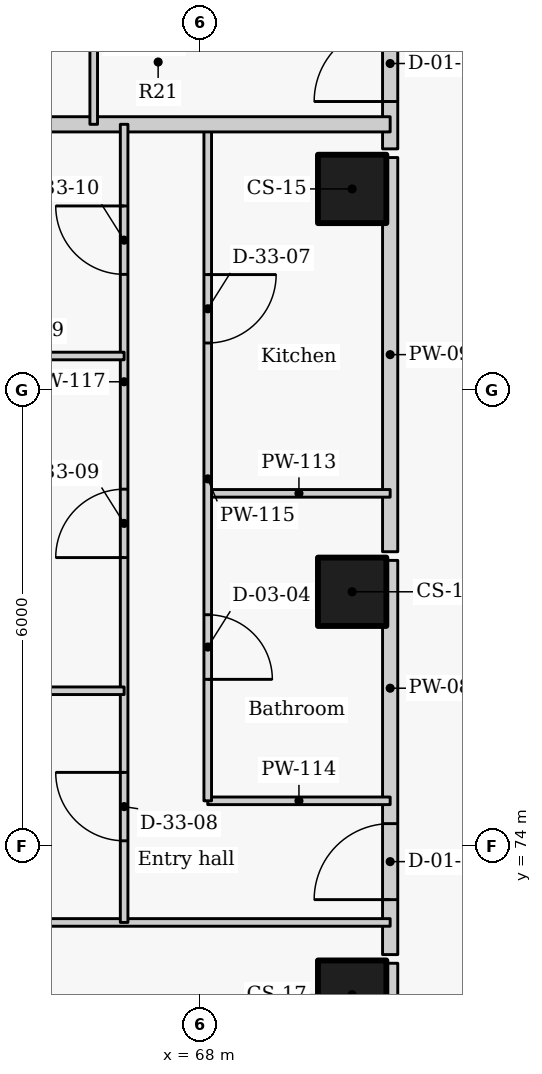
"""IFC4 building model, lengths in metres.
Left out: names, types, materials, properties, quantities, classifications, styles, units other than length and angle.
Written with IfcOpenShell. Run it as: python <this file> out.ifc"""

import sys

from ifc_helpers import new_model, si_unit, direction, frame, frame_2d, origin, origin_2d, place, context, subcontext, project, spatial, rectangle, extrude, element, fill, save


model = new_model("IFC4")
c1 = context("Model", 3, precision=1e-05, world=origin(), true_north=direction((0.0, 1.0)))
c2 = subcontext(c1, "Body", "Model", "MODEL_VIEW")
j1 = project(units=[si_unit("LENGTHUNIT", "METRE"), si_unit("PLANEANGLEUNIT", "RADIAN")], contexts=[c1])
p1 = place(None, origin())
s1 = spatial("IfcSite", under=j1, at=p1, CompositionType="ELEMENT")
p2 = place(p1, origin())
s2 = spatial("IfcBuilding", under=s1, at=p2, CompositionType="ELEMENT")
p3 = place(p2, frame((0.0, 0.0, 259.2)))
s3 = spatial("IfcBuildingStorey", under=s2, at=p3, CompositionType="ELEMENT", Elevation=259.2)
for number, where, z_axis, x_axis in (
    (1, (70.0, 82.65, 0.0), (0.0, 0.0, 1.0), (0.0, -1.0, 0.0)),
    (2, (70.0, 77.35, 0.0), (0.0, 0.0, 1.0), (0.0, -1.0, 0.0)),
    (3, (70.0, 72.05, 0.0), (0.0, 0.0, 1.0), (0.0, -1.0, 0.0)),
):
    element("IfcColumn", number, at=place(p3, frame(where, z_axis=z_axis, x_axis=x_axis)), inside=s3, PredefinedType="COLUMN", context=c2, shape_type="SweptSolid", body=[
        extrude(rectangle(XDim=0.9, YDim=0.9, at=origin_2d()), origin(), (0.0, 0.0, 1.0), 3.3),
    ])
p4 = place(p3, frame((70.5, 68.227, 0.0), z_axis=(0.0, 0.0, 1.0), x_axis=(0.0, 1.0, 0.0)))
e4 = element("IfcWall", 4, at=p4, inside=s3, PredefinedType="PARTITIONING", context=c2, shape_type="SweptSolid", body=[
    extrude(rectangle(XDim=4.236, YDim=0.2, at=frame_2d((2.118, 0.0))), origin(), (0.0, 0.0, 1.0), 3.025),
])
p5 = place(p4, frame((1.618, 0.0, 0.0)))
e5 = element("IfcOpeningElement", 5, at=p5, cuts=e4, PredefinedType="OPENING", context=c2, shape_type="SweptSolid", body=[
    extrude(rectangle(XDim=1.0, YDim=2.1, at=frame_2d((0.5, 1.05))), frame((0.0, 0.11, 0.0), z_axis=(0.0, -1.0, 0.0), x_axis=(1.0, 0.0, 0.0)), (0.0, 0.0, 1.0), 0.22),
])
p6 = place(p3, frame((70.5, 72.577, 0.0), z_axis=(0.0, 0.0, 1.0), x_axis=(0.0, 1.0, 0.0)))
e6 = element("IfcWall", 6, at=p6, inside=s3, PredefinedType="PARTITIONING", context=c2, shape_type="SweptSolid", body=[
    extrude(rectangle(XDim=5.186, YDim=0.2, at=frame_2d((2.593, 0.0))), origin(), (0.0, 0.0, 1.0), 3.025),
])
p7 = place(p6, frame((0.723, 0.0, 0.0)))
e7 = element("IfcOpeningElement", 7, at=p7, cuts=e6, PredefinedType="OPENING", context=c2, shape_type="SweptSolid", body=[
    extrude(rectangle(XDim=1.0, YDim=2.1, at=frame_2d((0.5, 1.05))), frame((0.0, 0.11, 0.0), z_axis=(0.0, -1.0, 0.0), x_axis=(1.0, 0.0, 0.0)), (0.0, 0.0, 1.0), 0.22),
])
p8 = place(p3, frame((70.5, 77.877, 0.0), z_axis=(0.0, 0.0, 1.0), x_axis=(0.0, 1.0, 0.0)))
e8 = element("IfcWall", 8, at=p8, inside=s3, PredefinedType="PARTITIONING", context=c2, shape_type="SweptSolid", body=[
    extrude(rectangle(XDim=5.186, YDim=0.2, at=frame_2d((2.593, 0.0))), origin(), (0.0, 0.0, 1.0), 3.025),
])
p9 = place(p3, frame((70.5, 83.177, 0.0), z_axis=(0.0, 0.0, 1.0), x_axis=(0.0, 1.0, 0.0)))
e9 = element("IfcWall", 9, at=p9, inside=s3, PredefinedType="PARTITIONING", context=c2, shape_type="SweptSolid", body=[
    extrude(rectangle(XDim=5.186, YDim=0.2, at=frame_2d((2.593, 0.0))), origin(), (0.0, 0.0, 1.0), 3.025),
])
p10 = place(p9, frame((0.623, 0.0, 0.0)))
e10 = element("IfcOpeningElement", 10, at=p10, cuts=e9, PredefinedType="OPENING", context=c2, shape_type="SweptSolid", body=[
    extrude(rectangle(XDim=1.0, YDim=2.1, at=frame_2d((0.5, 1.05))), frame((0.0, 0.11, 0.0), z_axis=(0.0, -1.0, 0.0), x_axis=(1.0, 0.0, 0.0)), (0.0, 0.0, 1.0), 0.22),
])
p11 = place(p3, frame((58.95, 73.0, 0.0), z_axis=(0.0, 0.0, 1.0), x_axis=(1.0, 0.0, 0.0)))
e11 = element("IfcWall", 11, at=p11, inside=s3, PredefinedType="PARTITIONING", context=c2, shape_type="SweptSolid", body=[
    extrude(rectangle(XDim=11.55, YDim=0.1, at=frame_2d((5.775, 0.0))), origin(), (0.0, 0.0, 1.0), 2.505),
])
for number, where, z_axis, x_axis in (
    (12, (68.1, 78.645, 0.0), (0.0, 0.0, 1.0), (1.0, 0.0, 0.0)),
    (13, (68.1, 74.6, 0.0), (0.0, 0.0, 1.0), (1.0, 0.0, 0.0)),
):
    element("IfcWall", number, at=place(p3, frame(where, z_axis=z_axis, x_axis=x_axis)), inside=s3, PredefinedType="PARTITIONING", context=c2, shape_type="SweptSolid", body=[
        extrude(rectangle(XDim=2.4, YDim=0.1, at=frame_2d((1.2, 0.0))), origin(), (0.0, 0.0, 1.0), 2.505),
    ])
p12 = place(p3, frame((68.1, 83.5, 0.0), z_axis=(0.0, 0.0, 1.0), x_axis=(0.0, -1.0, 0.0)))
e14 = element("IfcWall", 14, at=p12, inside=s3, PredefinedType="PARTITIONING", context=c2, shape_type="SweptSolid", body=[
    extrude(rectangle(XDim=8.9, YDim=0.1, at=frame_2d((4.45, 0.0))), origin(), (0.0, 0.0, 1.0), 3.025),
])
p13 = place(p12, frame((6.452, 0.0, 0.0)))
e15 = element("IfcOpeningElement", 15, at=p13, cuts=e14, PredefinedType="OPENING", context=c2, shape_type="SweptSolid", body=[
    extrude(rectangle(XDim=0.85, YDim=2.1, at=frame_2d((0.425, 1.05))), frame((0.0, 0.06, 0.0), z_axis=(0.0, -1.0, 0.0), x_axis=(1.0, 0.0, 0.0)), (0.0, 0.0, 1.0), 0.12),
])
p14 = place(p12, frame((1.977, 0.0, 0.0)))
e16 = element("IfcOpeningElement", 16, at=p14, cuts=e14, PredefinedType="OPENING", context=c2, shape_type="SweptSolid", body=[
    extrude(rectangle(XDim=0.9, YDim=2.1, at=frame_2d((0.45, 1.05))), frame((0.0, 0.06, 0.0), z_axis=(0.0, -1.0, 0.0), x_axis=(1.0, 0.0, 0.0)), (0.0, 0.0, 1.0), 0.12),
])
p15 = place(p3, frame((56.213, 83.5, 0.0), z_axis=(0.0, 0.0, 1.0), x_axis=(1.0, 0.0, 0.0)))
e17 = element("IfcWall", 17, at=p15, inside=s3, PredefinedType="PARTITIONING", context=c2, shape_type="SweptSolid", body=[
    extrude(rectangle(XDim=14.287, YDim=0.2, at=frame_2d((7.144, 0.0))), origin(), (0.0, 0.0, 1.0), 2.405),
])
p16 = place(p3, frame((67.0, 73.0, 0.0), z_axis=(0.0, 0.0, 1.0), x_axis=(0.0, 1.0, 0.0)))
e18 = element("IfcWall", 18, at=p16, inside=s3, PredefinedType="PARTITIONING", context=c2, shape_type="SweptSolid", body=[
    extrude(rectangle(XDim=10.5, YDim=0.1, at=frame_2d((5.25, 0.0))), origin(), (0.0, 0.0, 1.0), 3.025),
])
p17 = place(p16, frame((1.074, 0.0, 0.0)))
e19 = element("IfcOpeningElement", 19, at=p17, cuts=e18, PredefinedType="OPENING", context=c2, shape_type="SweptSolid", body=[
    extrude(rectangle(XDim=0.9, YDim=2.1, at=frame_2d((0.45, 1.05))), frame((0.0, 0.06, 0.0), z_axis=(0.0, -1.0, 0.0), x_axis=(1.0, 0.0, 0.0)), (0.0, 0.0, 1.0), 0.12),
])
p18 = place(p16, frame((4.8, 0.0, 0.0)))
e20 = element("IfcOpeningElement", 20, at=p18, cuts=e18, PredefinedType="OPENING", context=c2, shape_type="SweptSolid", body=[
    extrude(rectangle(XDim=0.9, YDim=2.1, at=frame_2d((0.45, 1.05))), frame((0.0, 0.06, 0.0), z_axis=(0.0, -1.0, 0.0), x_axis=(1.0, 0.0, 0.0)), (0.0, 0.0, 1.0), 0.12),
])
p19 = place(p16, frame((8.526, 0.0, 0.0)))
e21 = element("IfcOpeningElement", 21, at=p19, cuts=e18, PredefinedType="OPENING", context=c2, shape_type="SweptSolid", body=[
    extrude(rectangle(XDim=0.9, YDim=2.1, at=frame_2d((0.45, 1.05))), frame((0.0, 0.06, 0.0), z_axis=(0.0, -1.0, 0.0), x_axis=(1.0, 0.0, 0.0)), (0.0, 0.0, 1.0), 0.12),
])
p20 = place(p3, frame((56.474, 76.048, 0.0), z_axis=(0.0, 0.0, 1.0), x_axis=(1.0, 0.0, 0.0)))
e22 = element("IfcWall", 22, at=p20, inside=s3, PredefinedType="PARTITIONING", context=c2, shape_type="SweptSolid", body=[
    extrude(rectangle(XDim=10.526, YDim=0.1, at=frame_2d((5.263, 0.0))), origin(), (0.0, 0.0, 1.0), 2.405),
])
p21 = place(p3, frame((63.95, 80.452, 0.0), z_axis=(0.0, 0.0, 1.0), x_axis=(1.0, 0.0, 0.0)))
e23 = element("IfcWall", 23, at=p21, inside=s3, PredefinedType="PARTITIONING", context=c2, shape_type="SweptSolid", body=[
    extrude(rectangle(XDim=3.05, YDim=0.1, at=frame_2d((1.525, 0.0))), origin(), (0.0, 0.0, 1.0), 2.405),
])
p22 = place(p3, frame((66.6, 83.5, 0.0), z_axis=(0.0, 0.0, 1.0), x_axis=(0.0, 1.0, 0.0)))
e24 = element("IfcWall", 24, at=p22, inside=s3, PredefinedType="PARTITIONING", context=c2, shape_type="SweptSolid", body=[
    extrude(rectangle(XDim=10.75, YDim=0.1, at=frame_2d((5.375, 0.0))), origin(), (0.0, 0.0, 1.0), 3.025),
])
p23 = place(p22, frame((1.111, 0.0, 0.0)))
e25 = element("IfcOpeningElement", 25, at=p23, cuts=e24, PredefinedType="OPENING", context=c2, shape_type="SweptSolid", body=[
    extrude(rectangle(XDim=0.9, YDim=2.1, at=frame_2d((0.45, 1.05))), frame((0.0, 0.06, 0.0), z_axis=(0.0, -1.0, 0.0), x_axis=(1.0, 0.0, 0.0)), (0.0, 0.0, 1.0), 0.12),
])
p24 = place(p22, frame((4.925, 0.0, 0.0)))
e26 = element("IfcOpeningElement", 26, at=p24, cuts=e24, PredefinedType="OPENING", context=c2, shape_type="SweptSolid", body=[
    extrude(rectangle(XDim=0.9, YDim=2.1, at=frame_2d((0.45, 1.05))), frame((0.0, 0.06, 0.0), z_axis=(0.0, -1.0, 0.0), x_axis=(1.0, 0.0, 0.0)), (0.0, 0.0, 1.0), 0.12),
])
p25 = place(p22, frame((8.74, 0.0, 0.0)))
e27 = element("IfcOpeningElement", 27, at=p25, cuts=e24, PredefinedType="OPENING", context=c2, shape_type="SweptSolid", body=[
    extrude(rectangle(XDim=0.9, YDim=2.1, at=frame_2d((0.45, 1.05))), frame((0.0, 0.06, 0.0), z_axis=(0.0, -1.0, 0.0), x_axis=(1.0, 0.0, 0.0)), (0.0, 0.0, 1.0), 0.12),
])
p26 = place(p7, origin())
e28 = element("IfcDoor", 28, at=p26, inside=s3, OperationType="SINGLE_SWING_LEFT", PredefinedType="DOOR", context=c2, shape_type="SweptSolid", body=[
    extrude(rectangle(XDim=1.0, YDim=2.1, at=frame_2d((0.5, 1.05))), frame((0.0, 0.025, 0.0), z_axis=(0.0, -1.0, 0.0), x_axis=(1.0, 0.0, 0.0)), (0.0, 0.0, 1.0), 0.05),
])
fill(e7, e28)
p27 = place(p13, origin())
e29 = element("IfcDoor", 29, at=p27, inside=s3, OperationType="SINGLE_SWING_RIGHT", PredefinedType="DOOR", context=c2, shape_type="SweptSolid", body=[
    extrude(rectangle(XDim=0.85, YDim=2.1, at=frame_2d((0.425, 1.05))), frame((0.0, 0.025, 0.0), z_axis=(0.0, -1.0, 0.0), x_axis=(1.0, 0.0, 0.0)), (0.0, 0.0, 1.0), 0.05),
])
fill(e15, e29)
p28 = place(p14, origin())
e30 = element("IfcDoor", 30, at=p28, inside=s3, OperationType="SINGLE_SWING_LEFT", PredefinedType="DOOR", context=c2, shape_type="SweptSolid", body=[
    extrude(rectangle(XDim=0.9, YDim=2.1, at=frame_2d((0.45, 1.05))), frame((0.0, 0.025, 0.0), z_axis=(0.0, -1.0, 0.0), x_axis=(1.0, 0.0, 0.0)), (0.0, 0.0, 1.0), 0.05),
])
fill(e16, e30)
p29 = place(p17, origin())
e31 = element("IfcDoor", 31, at=p29, inside=s3, OperationType="SINGLE_SWING_RIGHT", PredefinedType="DOOR", context=c2, shape_type="SweptSolid", body=[
    extrude(rectangle(XDim=0.9, YDim=2.1, at=frame_2d((0.45, 1.05))), frame((0.0, 0.025, 0.0), z_axis=(0.0, -1.0, 0.0), x_axis=(1.0, 0.0, 0.0)), (0.0, 0.0, 1.0), 0.05),
])
fill(e19, e31)
p30 = place(p18, origin())
e32 = element("IfcDoor", 32, at=p30, inside=s3, OperationType="SINGLE_SWING_LEFT", PredefinedType="DOOR", context=c2, shape_type="SweptSolid", body=[
    extrude(rectangle(XDim=0.9, YDim=2.1, at=frame_2d((0.45, 1.05))), frame((0.0, 0.025, 0.0), z_axis=(0.0, -1.0, 0.0), x_axis=(1.0, 0.0, 0.0)), (0.0, 0.0, 1.0), 0.05),
])
fill(e20, e32)
p31 = place(p19, origin())
e33 = element("IfcDoor", 33, at=p31, inside=s3, OperationType="SINGLE_SWING_RIGHT", PredefinedType="DOOR", context=c2, shape_type="SweptSolid", body=[
    extrude(rectangle(XDim=0.9, YDim=2.1, at=frame_2d((0.45, 1.05))), frame((0.0, 0.025, 0.0), z_axis=(0.0, -1.0, 0.0), x_axis=(1.0, 0.0, 0.0)), (0.0, 0.0, 1.0), 0.05),
])
fill(e21, e33)
p32 = place(p10, origin())
e34 = element("IfcDoor", 34, at=p32, inside=s3, OperationType="SINGLE_SWING_LEFT", PredefinedType="DOOR", context=c2, shape_type="SweptSolid", body=[
    extrude(rectangle(XDim=1.0, YDim=2.1, at=frame_2d((0.5, 1.05))), frame((0.0, 0.025, 0.0), z_axis=(0.0, -1.0, 0.0), x_axis=(1.0, 0.0, 0.0)), (0.0, 0.0, 1.0), 0.05),
])
fill(e10, e34)
save(model, sys.argv[1])
